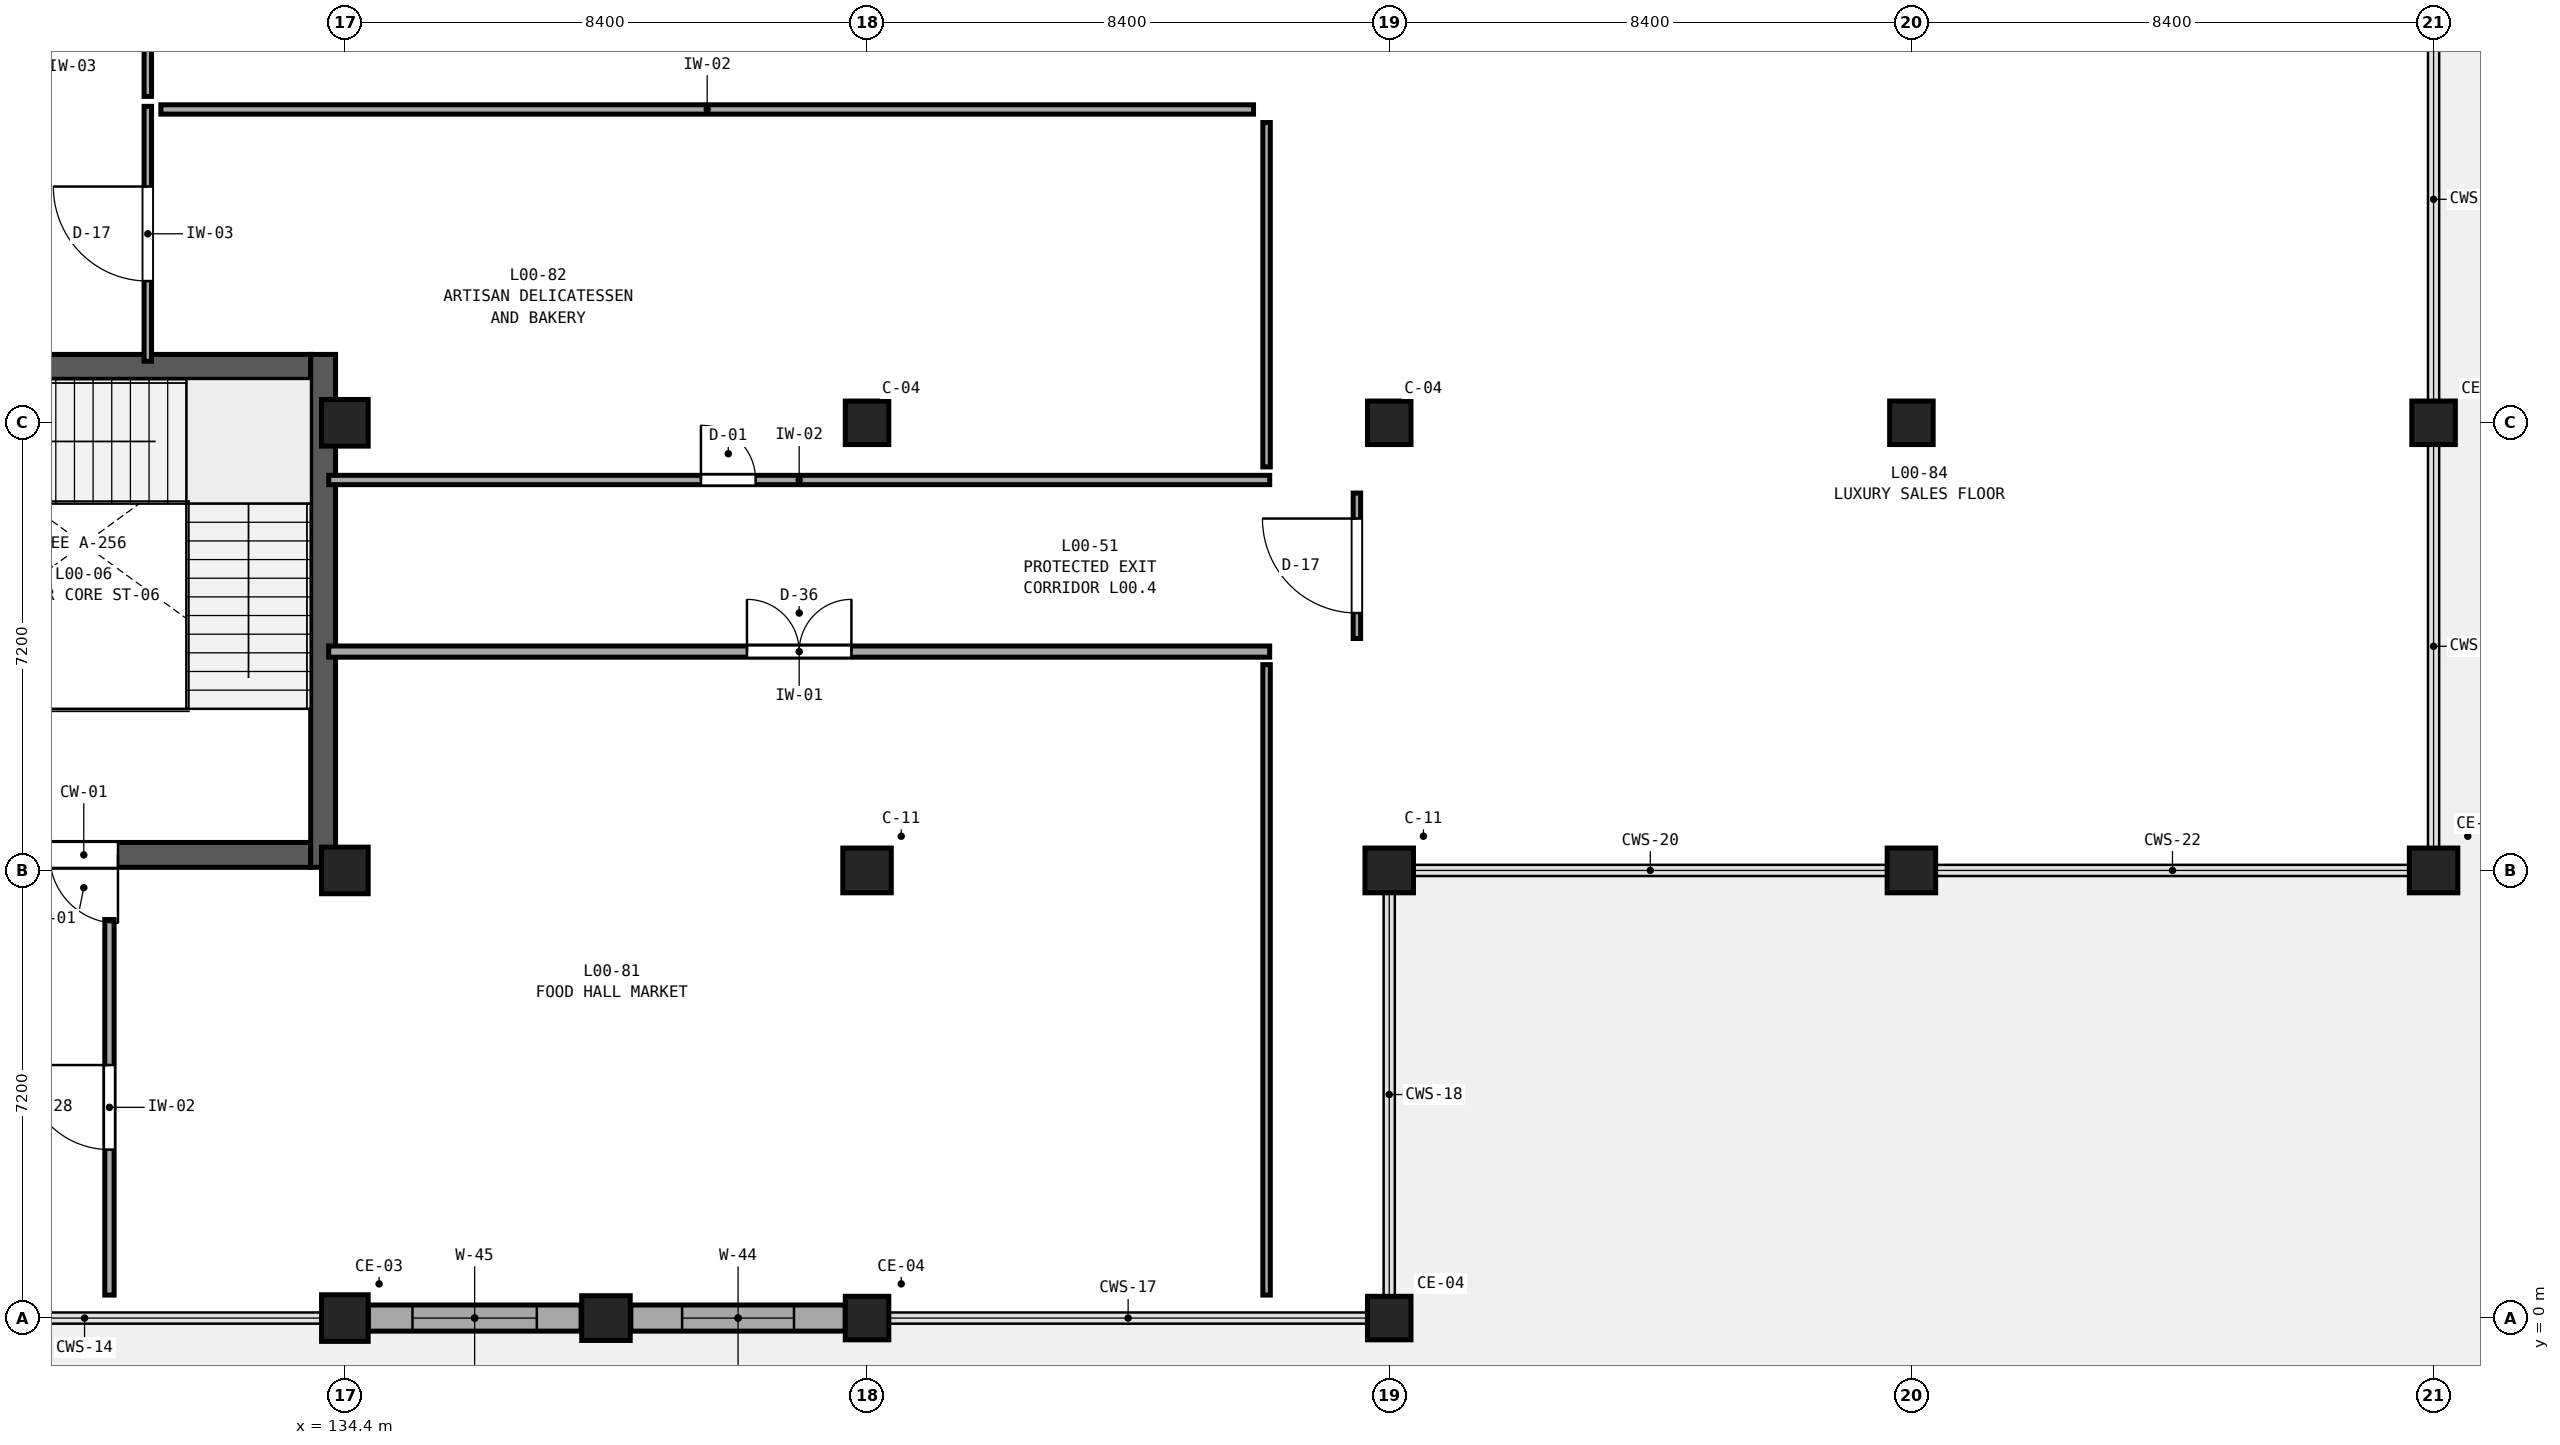
"""IFC4 building model, lengths in metres.
Left out: names, types, materials, properties, quantities, classifications, styles, units other than length and angle.
Written with IfcOpenShell. Run it as: python <this file> out.ifc"""

import sys

from ifc_helpers import new_model, si_unit, direction, frame, frame_2d, origin, origin_2d, place, context, subcontext, project, spatial, rectangle, extrude, element, fill, save


model = new_model("IFC4")
c1 = context("Model", 3, precision=1e-05, world=origin(), true_north=direction((0.0, 1.0)))
c2 = subcontext(c1, "Body", "Model", "MODEL_VIEW")
j1 = project(units=[si_unit("LENGTHUNIT", "METRE"), si_unit("PLANEANGLEUNIT", "RADIAN")], contexts=[c1])
p1 = place(None, origin())
s1 = spatial("IfcSite", under=j1, at=p1, CompositionType="ELEMENT")
p2 = place(p1, origin())
s2 = spatial("IfcBuilding", under=s1, at=p2, CompositionType="ELEMENT")
p3 = place(p2, origin())
s3 = spatial("IfcBuildingStorey", under=s2, at=p3, CompositionType="ELEMENT", Elevation=0.0)
for number, where, z_axis, x_axis in (
    (1, (134.4, 0.0, 0.0), (0.0, 0.0, 1.0), (1.0, 0.0, 0.0)),
    (2, (134.4, 7.2, 0.0), (0.0, 0.0, 1.0), (1.0, 0.0, 0.0)),
    (3, (134.4, 14.4, 0.0), (0.0, 0.0, 1.0), (1.0, 0.0, 0.0)),
):
    element("IfcColumn", number, at=place(p3, frame(where, z_axis=z_axis, x_axis=x_axis)), inside=s3, PredefinedType="COLUMN", context=c2, shape_type="SweptSolid", body=[
        extrude(rectangle(XDim=0.75, YDim=0.75, at=origin_2d()), origin(), (0.0, 0.0, 1.0), 5.4),
    ])
p4 = place(p3, frame((142.8, 0.0, 0.0), z_axis=(0.0, 0.0, 1.0), x_axis=(1.0, 0.0, 0.0)))
e4 = element("IfcColumn", 4, at=p4, inside=s3, PredefinedType="COLUMN", context=c2, shape_type="SweptSolid", body=[
    extrude(rectangle(XDim=0.7, YDim=0.7, at=origin_2d()), origin(), (0.0, 0.0, 1.0), 5.4),
])
p5 = place(p3, frame((142.8, 7.2, 0.0), z_axis=(0.0, 0.0, 1.0), x_axis=(1.0, 0.0, 0.0)))
e5 = element("IfcColumn", 5, at=p5, inside=s3, PredefinedType="PILASTER", context=c2, shape_type="SweptSolid", body=[
    extrude(rectangle(XDim=0.78, YDim=0.72, at=origin_2d()), origin(), (0.0, 0.0, 1.0), 5.4),
])
for number, where, z_axis, x_axis in (
    (6, (142.8, 14.4, 0.0), (0.0, 0.0, 1.0), (1.0, 0.0, 0.0)),
    (7, (151.2, 0.0, 0.0), (0.0, 0.0, 1.0), (1.0, 0.0, 0.0)),
):
    element("IfcColumn", number, at=place(p3, frame(where, z_axis=z_axis, x_axis=x_axis)), inside=s3, PredefinedType="COLUMN", context=c2, shape_type="SweptSolid", body=[
        extrude(rectangle(XDim=0.7, YDim=0.7, at=origin_2d()), origin(), (0.0, 0.0, 1.0), 5.4),
    ])
p6 = place(p3, frame((151.2, 7.2, 0.0), z_axis=(0.0, 0.0, 1.0), x_axis=(1.0, 0.0, 0.0)))
e8 = element("IfcColumn", 8, at=p6, inside=s3, PredefinedType="PILASTER", context=c2, shape_type="SweptSolid", body=[
    extrude(rectangle(XDim=0.78, YDim=0.72, at=origin_2d()), origin(), (0.0, 0.0, 1.0), 5.4),
])
p7 = place(p3, frame((151.2, 14.4, 0.0), z_axis=(0.0, 0.0, 1.0), x_axis=(1.0, 0.0, 0.0)))
e9 = element("IfcColumn", 9, at=p7, inside=s3, PredefinedType="COLUMN", context=c2, shape_type="SweptSolid", body=[
    extrude(rectangle(XDim=0.7, YDim=0.7, at=origin_2d()), origin(), (0.0, 0.0, 1.0), 5.4),
])
p8 = place(p3, frame((159.6, 7.2, 0.0), z_axis=(0.0, 0.0, 1.0), x_axis=(1.0, 0.0, 0.0)))
e10 = element("IfcColumn", 10, at=p8, inside=s3, PredefinedType="PILASTER", context=c2, shape_type="SweptSolid", body=[
    extrude(rectangle(XDim=0.78, YDim=0.72, at=origin_2d()), origin(), (0.0, 0.0, 1.0), 5.4),
])
p9 = place(p3, frame((159.6, 14.4, 0.0), z_axis=(0.0, 0.0, 1.0), x_axis=(1.0, 0.0, 0.0)))
e11 = element("IfcColumn", 11, at=p9, inside=s3, PredefinedType="COLUMN", context=c2, shape_type="SweptSolid", body=[
    extrude(rectangle(XDim=0.7, YDim=0.7, at=origin_2d()), origin(), (0.0, 0.0, 1.0), 5.4),
])
p10 = place(p3, frame((168.0, 7.2, 0.0), z_axis=(0.0, 0.0, 1.0), x_axis=(1.0, 0.0, 0.0)))
e12 = element("IfcColumn", 12, at=p10, inside=s3, PredefinedType="PILASTER", context=c2, shape_type="SweptSolid", body=[
    extrude(rectangle(XDim=0.78, YDim=0.72, at=origin_2d()), origin(), (0.0, 0.0, 1.0), 5.4),
])
p11 = place(p3, frame((168.0, 14.4, 0.0), z_axis=(0.0, 0.0, 1.0), x_axis=(1.0, 0.0, 0.0)))
e13 = element("IfcColumn", 13, at=p11, inside=s3, PredefinedType="COLUMN", context=c2, shape_type="SweptSolid", body=[
    extrude(rectangle(XDim=0.7, YDim=0.7, at=origin_2d()), origin(), (0.0, 0.0, 1.0), 5.4),
])
p12 = place(p3, frame((138.6, 0.0, 0.0), z_axis=(0.0, 0.0, 1.0), x_axis=(1.0, 0.0, 0.0)))
e14 = element("IfcColumn", 14, at=p12, inside=s3, PredefinedType="PILASTER", context=c2, shape_type="SweptSolid", body=[
    extrude(rectangle(XDim=0.78, YDim=0.72, at=origin_2d()), origin(), (0.0, 0.0, 1.0), 5.4),
])
p13 = place(p3, frame((142.45, 0.0, 0.0), z_axis=(0.0, 0.0, 1.0), x_axis=(-1.0, 0.0, 0.0)))
e15 = element("IfcWall", 15, at=p13, inside=s3, PredefinedType="SOLIDWALL", context=c2, shape_type="SweptSolid", body=[
    extrude(rectangle(XDim=3.45, YDim=0.42, at=frame_2d((1.725, 0.0))), origin(), (0.0, 0.0, 1.0), 4.53),
])
p14 = place(p13, frame((0.825, 0.0, 0.75)))
e16 = element("IfcOpeningElement", 16, at=p14, cuts=e15, PredefinedType="OPENING", context=c2, shape_type="SweptSolid", body=[
    extrude(rectangle(XDim=1.8, YDim=2.8, at=frame_2d((0.9, 1.4))), frame((0.0, 0.23, 0.0), z_axis=(0.0, -1.0, 0.0), x_axis=(1.0, 0.0, 0.0)), (0.0, 0.0, 1.0), 0.46),
])
p15 = place(p3, frame((138.2, 0.0, 0.0), z_axis=(0.0, 0.0, 1.0), x_axis=(-1.0, 0.0, 0.0)))
e17 = element("IfcWall", 17, at=p15, inside=s3, PredefinedType="SOLIDWALL", context=c2, shape_type="SweptSolid", body=[
    extrude(rectangle(XDim=3.425, YDim=0.42, at=frame_2d((1.712, 0.0))), origin(), (0.0, 0.0, 1.0), 4.53),
])
p16 = place(p15, frame((0.712, 0.0, 0.75)))
e18 = element("IfcOpeningElement", 18, at=p16, cuts=e17, PredefinedType="OPENING", context=c2, shape_type="SweptSolid", body=[
    extrude(rectangle(XDim=2.0, YDim=2.8, at=frame_2d((1.0, 1.4))), frame((0.0, 0.23, 0.0), z_axis=(0.0, -1.0, 0.0), x_axis=(1.0, 0.0, 0.0)), (0.0, 0.0, 1.0), 0.46),
])
p17 = place(p3, frame((133.85, 7.45, 0.0), z_axis=(0.0, 0.0, 1.0), x_axis=(-1.0, 0.0, 0.0)))
e19 = element("IfcWall", 19, at=p17, inside=s3, PredefinedType="SHEAR", context=c2, shape_type="SweptSolid", body=[
    extrude(rectangle(XDim=7.3, YDim=0.4, at=frame_2d((3.65, 0.0))), origin(), (0.0, 0.0, 1.0), 5.4),
])
p18 = place(p17, frame((3.1, 0.0, 0.0)))
e20 = element("IfcOpeningElement", 20, at=p18, cuts=e19, PredefinedType="OPENING", context=c2, shape_type="SweptSolid", body=[
    extrude(rectangle(XDim=1.1, YDim=2.2, at=frame_2d((0.55, 1.1))), frame((0.0, 0.22, 0.0), z_axis=(0.0, -1.0, 0.0), x_axis=(1.0, 0.0, 0.0)), (0.0, 0.0, 1.0), 0.44),
])
p19 = place(p3, frame((126.55, 15.3, 0.0), z_axis=(0.0, 0.0, 1.0), x_axis=(1.0, 0.0, 0.0)))
e21 = element("IfcWall", 21, at=p19, inside=s3, PredefinedType="SHEAR", context=c2, shape_type="SweptSolid", body=[
    extrude(rectangle(XDim=7.3, YDim=0.4, at=frame_2d((3.65, 0.0))), origin(), (0.0, 0.0, 1.0), 5.4),
])
p20 = place(p3, frame((134.05, 7.25, 0.0), z_axis=(0.0, 0.0, 1.0), x_axis=(0.0, 1.0, 0.0)))
e22 = element("IfcWall", 22, at=p20, inside=s3, PredefinedType="SHEAR", context=c2, shape_type="SweptSolid", body=[
    extrude(rectangle(XDim=8.25, YDim=0.4, at=frame_2d((4.125, 0.0))), origin(), (0.0, 0.0, 1.0), 5.4),
])
p21 = place(p3, frame((134.14, 10.72, 0.0), z_axis=(0.0, 0.0, 1.0), x_axis=(1.0, 0.0, 0.0)))
e23 = element("IfcWall", 23, at=p21, inside=s3, PredefinedType="PARTITIONING", context=c2, shape_type="SweptSolid", body=[
    extrude(rectangle(XDim=15.137, YDim=0.18, at=frame_2d((7.569, 0.0))), origin(), (0.0, 0.0, 1.0), 5.08),
])
p22 = place(p21, frame((6.729, 0.0, 0.0)))
e24 = element("IfcOpeningElement", 24, at=p22, cuts=e23, PredefinedType="OPENING", context=c2, shape_type="SweptSolid", body=[
    extrude(rectangle(XDim=1.68, YDim=2.45, at=frame_2d((0.84, 1.225))), frame((0.0, 0.11, 0.0), z_axis=(0.0, -1.0, 0.0), x_axis=(1.0, 0.0, 0.0)), (0.0, 0.0, 1.0), 0.22),
])
p23 = place(p3, frame((134.14, 13.48, 0.0), z_axis=(0.0, 0.0, 1.0), x_axis=(1.0, 0.0, 0.0)))
e25 = element("IfcWall", 25, at=p23, inside=s3, PredefinedType="PARTITIONING", context=c2, shape_type="SweptSolid", body=[
    extrude(rectangle(XDim=15.137, YDim=0.15, at=frame_2d((7.569, 0.0))), origin(), (0.0, 0.0, 1.0), 5.08),
])
p24 = place(p23, frame((5.988, 0.0, 0.0)))
e26 = element("IfcOpeningElement", 26, at=p24, cuts=e25, PredefinedType="OPENING", context=c2, shape_type="SweptSolid", body=[
    extrude(rectangle(XDim=0.88, YDim=2.05, at=frame_2d((0.44, 1.025))), frame((0.0, 0.095, 0.0), z_axis=(0.0, -1.0, 0.0), x_axis=(1.0, 0.0, 0.0)), (0.0, 0.0, 1.0), 0.19),
])
p25 = place(p3, frame((130.613, 0.37, 0.0), z_axis=(0.0, 0.0, 1.0), x_axis=(0.0, 1.0, 0.0)))
e27 = element("IfcWall", 27, at=p25, inside=s3, PredefinedType="PARTITIONING", context=c2, shape_type="SweptSolid", body=[
    extrude(rectangle(XDim=6.04, YDim=0.15, at=frame_2d((3.02, 0.0))), origin(), (0.0, 0.0, 1.0), 5.08),
])
p26 = place(p25, frame((2.34, 0.0, 0.0)))
e28 = element("IfcOpeningElement", 28, at=p26, cuts=e27, PredefinedType="OPENING", context=c2, shape_type="SweptSolid", body=[
    extrude(rectangle(XDim=1.36, YDim=2.37, at=frame_2d((0.68, 1.185))), frame((0.0, 0.095, 0.0), z_axis=(0.0, -1.0, 0.0), x_axis=(1.0, 0.0, 0.0)), (0.0, 0.0, 1.0), 0.19),
])
p27 = place(p3, frame((131.23, 19.65, 0.0), z_axis=(0.0, 0.0, 1.0), x_axis=(0.0, 1.0, 0.0)))
e29 = element("IfcWall", 29, at=p27, inside=s3, PredefinedType="PARTITIONING", context=c2, shape_type="SweptSolid", body=[
    extrude(rectangle(XDim=5.21, YDim=0.12, at=frame_2d((2.605, 0.0))), origin(), (0.0, 0.0, 1.0), 5.08),
])
p28 = place(p27, frame((1.845, 0.0, 0.0)))
e30 = element("IfcOpeningElement", 30, at=p28, cuts=e29, PredefinedType="OPENING", context=c2, shape_type="SweptSolid", body=[
    extrude(rectangle(XDim=1.52, YDim=2.13, at=frame_2d((0.76, 1.065))), frame((0.0, 0.08, 0.0), z_axis=(0.0, -1.0, 0.0), x_axis=(1.0, 0.0, 0.0)), (0.0, 0.0, 1.0), 0.16),
])
p29 = place(p3, frame((131.23, 15.39, 0.0), z_axis=(0.0, 0.0, 1.0), x_axis=(0.0, 1.0, 0.0)))
e31 = element("IfcWall", 31, at=p29, inside=s3, PredefinedType="PARTITIONING", context=c2, shape_type="SweptSolid", body=[
    extrude(rectangle(XDim=4.1, YDim=0.12, at=frame_2d((2.05, 0.0))), origin(), (0.0, 0.0, 1.0), 5.08),
])
p30 = place(p29, frame((1.29, 0.0, 0.0)))
e32 = element("IfcOpeningElement", 32, at=p30, cuts=e31, PredefinedType="OPENING", context=c2, shape_type="SweptSolid", body=[
    extrude(rectangle(XDim=1.52, YDim=2.21, at=frame_2d((0.76, 1.105))), frame((0.0, 0.08, 0.0), z_axis=(0.0, -1.0, 0.0), x_axis=(1.0, 0.0, 0.0)), (0.0, 0.0, 1.0), 0.16),
])
p31 = place(p3, frame((150.68, 10.93, 0.0), z_axis=(0.0, 0.0, 1.0), x_axis=(0.0, 1.0, 0.0)))
e33 = element("IfcWall", 33, at=p31, inside=s3, PredefinedType="PARTITIONING", context=c2, shape_type="SweptSolid", body=[
    extrude(rectangle(XDim=2.34, YDim=0.12, at=frame_2d((1.17, 0.0))), origin(), (0.0, 0.0, 1.0), 4.58),
])
p32 = place(p31, frame((0.41, 0.0, 0.0)))
e34 = element("IfcOpeningElement", 34, at=p32, cuts=e33, PredefinedType="OPENING", context=c2, shape_type="SweptSolid", body=[
    extrude(rectangle(XDim=1.52, YDim=2.21, at=frame_2d((0.76, 1.105))), frame((0.0, 0.08, 0.0), z_axis=(0.0, -1.0, 0.0), x_axis=(1.0, 0.0, 0.0)), (0.0, 0.0, 1.0), 0.16),
])
p33 = place(p3, frame((131.44, 19.44, 0.0), z_axis=(0.0, 0.0, 1.0), x_axis=(1.0, 0.0, 0.0)))
e35 = element("IfcWall", 35, at=p33, inside=s3, PredefinedType="PARTITIONING", context=c2, shape_type="SweptSolid", body=[
    extrude(rectangle(XDim=17.577, YDim=0.15, at=frame_2d((8.789, 0.0))), origin(), (0.0, 0.0, 1.0), 5.08),
])
p34 = place(p3, frame((149.227, 0.37, 0.0), z_axis=(0.0, 0.0, 1.0), x_axis=(0.0, 1.0, 0.0)))
e36 = element("IfcWall", 36, at=p34, inside=s3, PredefinedType="PARTITIONING", context=c2, shape_type="SweptSolid", body=[
    extrude(rectangle(XDim=10.14, YDim=0.12, at=frame_2d((5.07, 0.0))), origin(), (0.0, 0.0, 1.0), 5.08),
])
p35 = place(p3, frame((149.227, 13.69, 0.0), z_axis=(0.0, 0.0, 1.0), x_axis=(0.0, 1.0, 0.0)))
e37 = element("IfcWall", 37, at=p35, inside=s3, PredefinedType="PARTITIONING", context=c2, shape_type="SweptSolid", body=[
    extrude(rectangle(XDim=5.54, YDim=0.12, at=frame_2d((2.77, 0.0))), origin(), (0.0, 0.0, 1.0), 5.08),
])
p36 = place(p14, origin())
e38 = element("IfcWindow", 38, at=p36, inside=s3, PartitioningType="DOUBLE_PANEL_VERTICAL", PredefinedType="WINDOW", context=c2, shape_type="SweptSolid", body=[
    extrude(rectangle(XDim=1.8, YDim=2.8, at=frame_2d((0.9, 1.4))), frame((0.0, 0.03, 0.0), z_axis=(0.0, -1.0, 0.0), x_axis=(1.0, 0.0, 0.0)), (0.0, 0.0, 1.0), 0.06),
])
fill(e16, e38)
p37 = place(p16, origin())
e39 = element("IfcWindow", 39, at=p37, inside=s3, PartitioningType="TRIPLE_PANEL_VERTICAL", PredefinedType="WINDOW", context=c2, shape_type="SweptSolid", body=[
    extrude(rectangle(XDim=2.0, YDim=2.8, at=frame_2d((1.0, 1.4))), frame((0.0, 0.03, 0.0), z_axis=(0.0, -1.0, 0.0), x_axis=(1.0, 0.0, 0.0)), (0.0, 0.0, 1.0), 0.06),
])
fill(e18, e39)
p38 = place(p18, origin())
e40 = element("IfcDoor", 40, at=p38, inside=s3, OperationType="SINGLE_SWING_LEFT", PredefinedType="DOOR", context=c2, shape_type="SweptSolid", body=[
    extrude(rectangle(XDim=1.1, YDim=2.2, at=frame_2d((0.55, 1.1))), frame((0.0, 0.025, 0.0), z_axis=(0.0, -1.0, 0.0), x_axis=(1.0, 0.0, 0.0)), (0.0, 0.0, 1.0), 0.05),
])
fill(e20, e40)
p39 = place(p22, frame((1.68, 0.0, 0.0), z_axis=(0.0, 0.0, 1.0), x_axis=(-1.0, 0.0, 0.0)))
e41 = element("IfcDoor", 41, at=p39, inside=s3, OperationType="DOUBLE_DOOR_SINGLE_SWING", PredefinedType="DOOR", context=c2, shape_type="SweptSolid", body=[
    extrude(rectangle(XDim=1.68, YDim=2.45, at=frame_2d((0.84, 1.225))), frame((0.0, 0.025, 0.0), z_axis=(0.0, -1.0, 0.0), x_axis=(1.0, 0.0, 0.0)), (0.0, 0.0, 1.0), 0.05),
])
fill(e24, e41)
p40 = place(p24, origin())
e42 = element("IfcDoor", 42, at=p40, inside=s3, OperationType="SINGLE_SWING_LEFT", PredefinedType="DOOR", context=c2, shape_type="SweptSolid", body=[
    extrude(rectangle(XDim=0.88, YDim=2.05, at=frame_2d((0.44, 1.025))), frame((0.0, 0.025, 0.0), z_axis=(0.0, -1.0, 0.0), x_axis=(1.0, 0.0, 0.0)), (0.0, 0.0, 1.0), 0.05),
])
fill(e26, e42)
p41 = place(p26, origin())
e43 = element("IfcDoor", 43, at=p41, inside=s3, OperationType="SINGLE_SWING_RIGHT", PredefinedType="DOOR", context=c2, shape_type="SweptSolid", body=[
    extrude(rectangle(XDim=1.36, YDim=2.37, at=frame_2d((0.68, 1.185))), frame((0.0, 0.025, 0.0), z_axis=(0.0, -1.0, 0.0), x_axis=(1.0, 0.0, 0.0)), (0.0, 0.0, 1.0), 0.05),
])
fill(e28, e43)
p42 = place(p30, frame((1.52, 0.0, 0.0), z_axis=(0.0, 0.0, 1.0), x_axis=(-1.0, 0.0, 0.0)))
e44 = element("IfcDoor", 44, at=p42, inside=s3, OperationType="SINGLE_SWING_RIGHT", PredefinedType="DOOR", context=c2, shape_type="SweptSolid", body=[
    extrude(rectangle(XDim=1.52, YDim=2.21, at=frame_2d((0.76, 1.105))), frame((0.0, 0.025, 0.0), z_axis=(0.0, -1.0, 0.0), x_axis=(1.0, 0.0, 0.0)), (0.0, 0.0, 1.0), 0.05),
])
fill(e32, e44)
p43 = place(p32, frame((1.52, 0.0, 0.0), z_axis=(0.0, 0.0, 1.0), x_axis=(-1.0, 0.0, 0.0)))
e45 = element("IfcDoor", 45, at=p43, inside=s3, OperationType="SINGLE_SWING_RIGHT", PredefinedType="DOOR", context=c2, shape_type="SweptSolid", body=[
    extrude(rectangle(XDim=1.52, YDim=2.21, at=frame_2d((0.76, 1.105))), frame((0.0, 0.025, 0.0), z_axis=(0.0, -1.0, 0.0), x_axis=(1.0, 0.0, 0.0)), (0.0, 0.0, 1.0), 0.05),
])
fill(e34, e45)
save(model, sys.argv[1])
